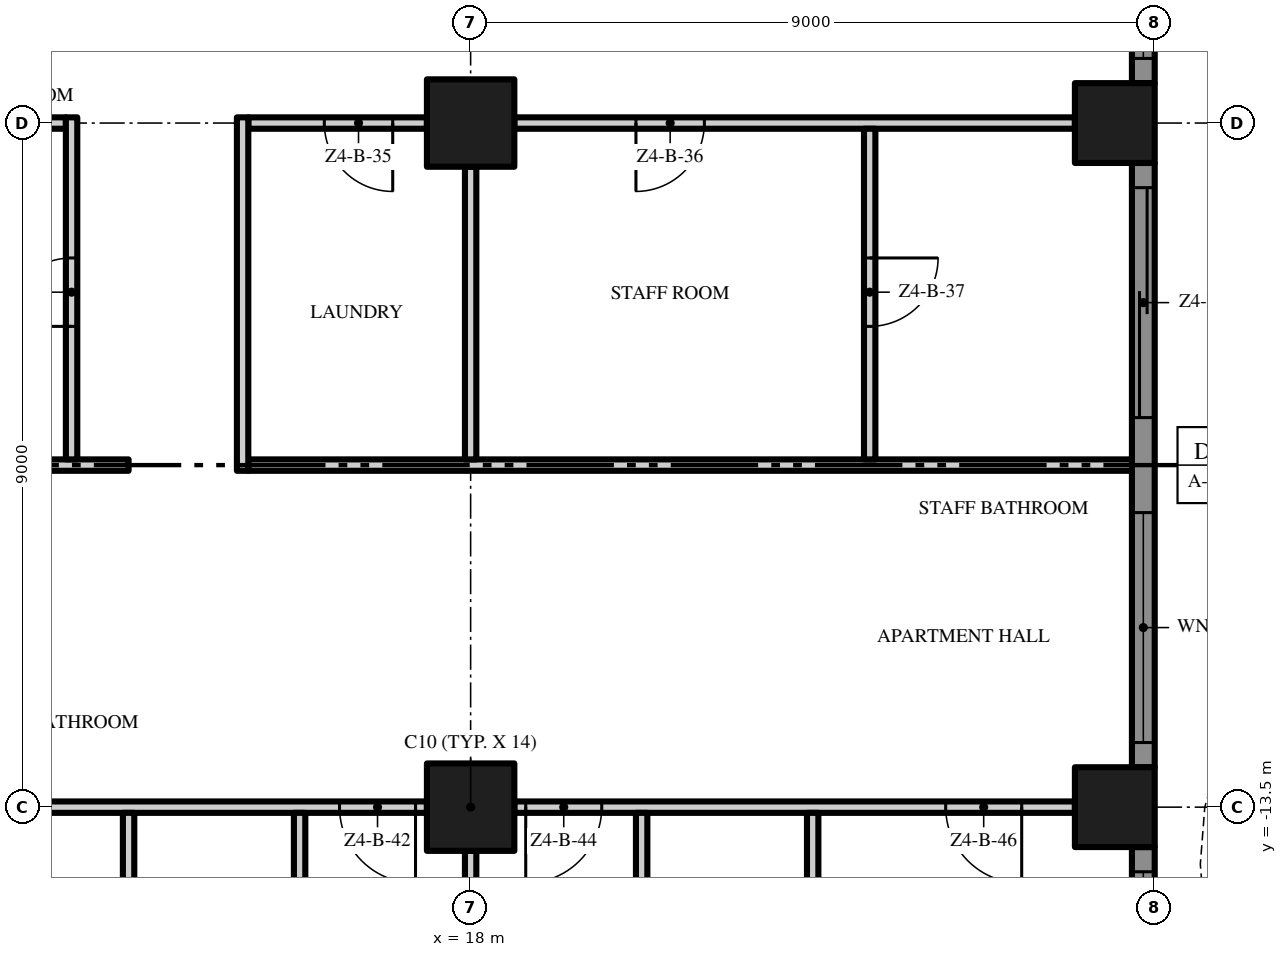
"""IFC4 building model, lengths in metres.
Left out: names, types, materials, properties, quantities, classifications, styles, units other than length and angle.
Written with IfcOpenShell. Run it as: python <this file> out.ifc"""

import sys

from ifc_helpers import new_model, si_unit, direction, frame, frame_2d, origin, origin_2d, place, context, subcontext, project, spatial, polyline, rectangle, outline, extrude, element, fill, save


model = new_model("IFC4")
c1 = context("Model", 3, precision=1e-05, world=origin(), true_north=direction((0.0, 1.0)))
c2 = subcontext(c1, "Body", "Model", "MODEL_VIEW")
j1 = project(units=[si_unit("LENGTHUNIT", "METRE"), si_unit("PLANEANGLEUNIT", "RADIAN")], contexts=[c1])
p1 = place(None, origin())
s1 = spatial("IfcSite", under=j1, at=p1, CompositionType="ELEMENT")
p2 = place(p1, origin())
s2 = spatial("IfcBuilding", under=s1, at=p2, CompositionType="ELEMENT")
p3 = place(p2, frame((0.0, 0.0, 195.8)))
s3 = spatial("IfcBuildingStorey", under=s2, at=p3, CompositionType="ELEMENT", Elevation=195.8)
for number, where, z_axis, x_axis in (
    (1, (18.0, -13.5, 0.0), (0.0, 0.0, 1.0), (1.0, 0.0, 0.0)),
    (2, (18.0, -4.5, 0.0), (0.0, 0.0, 1.0), (1.0, 0.0, 0.0)),
):
    element("IfcColumn", number, at=place(p3, frame(where, z_axis=z_axis, x_axis=x_axis)), inside=s3, PredefinedType="COLUMN", context=c2, shape_type="SweptSolid", body=[
        extrude(rectangle(XDim=1.15, YDim=1.15, at=origin_2d()), origin(), (0.0, 0.0, 1.0), 3.5),
    ])
for number, where, z_axis, x_axis in (
    (3, (26.475, -13.5, 0.0), (0.0, 0.0, 1.0), (1.0, 0.0, 0.0)),
    (4, (26.475, -4.5, 0.0), (0.0, 0.0, 1.0), (1.0, 0.0, 0.0)),
):
    element("IfcColumn", number, at=place(p3, frame(where, z_axis=z_axis, x_axis=x_axis)), inside=s3, PredefinedType="COLUMN", context=c2, shape_type="SweptSolid", body=[
        extrude(rectangle(XDim=1.05, YDim=1.05, at=origin_2d()), origin(), (0.0, 0.0, 1.0), 3.5),
    ])
p4 = place(p3, frame((26.85, -14.025, 0.0), z_axis=(0.0, 0.0, 1.0), x_axis=(0.0, -1.0, 0.0)))
e5 = element("IfcWall", 5, at=p4, inside=s3, PredefinedType="SOLIDWALL", context=c2, shape_type="SweptSolid", body=[
    extrude(rectangle(XDim=3.675, YDim=0.3, at=frame_2d((1.837, 0.0))), origin(), (0.0, 0.0, 1.0), 3.5),
])
p5 = place(p4, frame((0.325, 0.0, 0.45)))
e6 = element("IfcOpeningElement", 6, at=p5, cuts=e5, PredefinedType="OPENING", context=c2, shape_type="SweptSolid", body=[
    extrude(rectangle(XDim=3.025, YDim=2.65, at=frame_2d((1.512, 1.325))), frame((0.0, 0.16, 0.0), z_axis=(0.0, -1.0, 0.0), x_axis=(1.0, 0.0, 0.0)), (0.0, 0.0, 1.0), 0.32),
])
p6 = place(p3, frame((26.85, -5.025, 0.0), z_axis=(0.0, 0.0, 1.0), x_axis=(0.0, -1.0, 0.0)))
e7 = element("IfcWall", 7, at=p6, inside=s3, PredefinedType="SOLIDWALL", context=c2, shape_type="SweptSolid", body=[
    extrude(rectangle(XDim=7.95, YDim=0.3, at=frame_2d((3.975, 0.0))), origin(), (0.0, 0.0, 1.0), 3.5),
])
p7 = place(p6, frame((4.6, 0.0, 0.45)))
e8 = element("IfcOpeningElement", 8, at=p7, cuts=e7, PredefinedType="OPENING", context=c2, shape_type="SweptSolid", body=[
    extrude(rectangle(XDim=3.025, YDim=2.65, at=frame_2d((1.512, 1.325))), frame((0.0, 0.16, 0.0), z_axis=(0.0, -1.0, 0.0), x_axis=(1.0, 0.0, 0.0)), (0.0, 0.0, 1.0), 0.32),
])
p8 = place(p6, frame((0.325, 0.0, 0.0)))
e9 = element("IfcOpeningElement", 9, at=p8, cuts=e7, PredefinedType="OPENING", context=c2, shape_type="SweptSolid", body=[
    extrude(rectangle(XDim=3.025, YDim=2.4, at=frame_2d((1.512, 1.2))), frame((0.0, 0.16, 0.0), z_axis=(0.0, -1.0, 0.0), x_axis=(1.0, 0.0, 0.0)), (0.0, 0.0, 1.0), 0.32),
])
p9 = place(p3, frame((26.85, 3.975, 0.0), z_axis=(0.0, 0.0, 1.0), x_axis=(0.0, -1.0, 0.0)))
e10 = element("IfcWall", 10, at=p9, inside=s3, PredefinedType="SOLIDWALL", context=c2, shape_type="SweptSolid", body=[
    extrude(rectangle(XDim=7.95, YDim=0.3, at=frame_2d((3.975, 0.0))), origin(), (0.0, 0.0, 1.0), 3.5),
])
p10 = place(p9, frame((4.6, 0.0, 0.45)))
e11 = element("IfcOpeningElement", 11, at=p10, cuts=e10, PredefinedType="OPENING", context=c2, shape_type="SweptSolid", body=[
    extrude(rectangle(XDim=3.025, YDim=2.65, at=frame_2d((1.512, 1.325))), frame((0.0, 0.16, 0.0), z_axis=(0.0, -1.0, 0.0), x_axis=(1.0, 0.0, 0.0)), (0.0, 0.0, 1.0), 0.32),
])
p11 = place(p9, frame((0.325, 0.0, 0.45)))
e12 = element("IfcOpeningElement", 12, at=p11, cuts=e10, PredefinedType="OPENING", context=c2, shape_type="SweptSolid", body=[
    extrude(rectangle(XDim=3.025, YDim=2.65, at=frame_2d((1.512, 1.325))), frame((0.0, 0.16, 0.0), z_axis=(0.0, -1.0, 0.0), x_axis=(1.0, 0.0, 0.0)), (0.0, 0.0, 1.0), 0.32),
])
p12 = place(p3, origin())
e13 = element("IfcWall", 13, at=p12, inside=s3, PredefinedType="USERDEFINED", context=c2, shape_type="SweptSolid", body=[
    extrude(outline(polyline([(28.8, -18.0), (28.095, -16.5), (27.659, -15.0), (27.6, -14.25), (27.659, -13.5), (28.095, -12.0), (28.8, -10.5), (29.505, -9.0), (29.941, -7.5), (30.0, -6.75), (29.941, -6.0), (29.505, -4.5), (28.8, -3.0), (28.095, -1.5), (27.659, 0.0), (27.6, 0.75), (27.659, 1.5), (28.095, 3.0), (28.8, 4.5), (29.505, 6.0), (29.941, 7.5), (30.0, 8.25), (29.941, 9.0), (29.505, 10.5), (28.8, 12.0), (28.095, 13.5), (27.659, 15.0), (27.6, 15.75), (27.659, 16.5), (28.095, 18.0), (27.855, 18.07), (27.411, 16.545), (27.349, 15.75), (27.411, 14.955), (27.86, 13.411), (28.574, 11.894), (29.271, 10.411), (29.694, 8.955), (29.749, 8.25), (29.694, 7.545), (29.271, 6.089), (28.574, 4.606), (27.86, 3.089), (27.411, 1.545), (27.349, 0.75), (27.411, -0.045), (27.86, -1.589), (28.574, -3.106), (29.271, -4.589), (29.694, -6.045), (29.749, -6.75), (29.694, -7.455), (29.271, -8.911), (28.574, -10.394), (27.86, -11.911), (27.411, -13.455), (27.349, -14.25), (27.411, -15.045), (27.86, -16.589), (28.574, -18.106), (28.8, -18.0)])), origin(), (0.0, 0.0, 1.0), 0.9),
])
p13 = place(p3, frame((17.425, -13.5, 0.0), z_axis=(0.0, 0.0, 1.0), x_axis=(-1.0, 0.0, 0.0)))
e14 = element("IfcWall", 14, at=p13, inside=s3, PredefinedType="PARTITIONING", context=c2, shape_type="SweptSolid", body=[
    extrude(rectangle(XDim=7.85, YDim=0.15, at=frame_2d((3.925, 0.0))), origin(), (0.0, 0.0, 1.0), 3.5),
])
p14 = place(p13, frame((6.7, 0.0, 0.0)))
e15 = element("IfcOpeningElement", 15, at=p14, cuts=e14, PredefinedType="OPENING", context=c2, shape_type="SweptSolid", body=[
    extrude(rectangle(XDim=1.0, YDim=2.4, at=frame_2d((0.5, 1.2))), frame((0.0, 0.085, 0.0), z_axis=(0.0, -1.0, 0.0), x_axis=(1.0, 0.0, 0.0)), (0.0, 0.0, 1.0), 0.17),
])
p15 = place(p13, frame((0.15, 0.0, 0.0)))
e16 = element("IfcOpeningElement", 16, at=p15, cuts=e14, PredefinedType="OPENING", context=c2, shape_type="SweptSolid", body=[
    extrude(rectangle(XDim=1.0, YDim=2.4, at=frame_2d((0.5, 1.2))), frame((0.0, 0.085, 0.0), z_axis=(0.0, -1.0, 0.0), x_axis=(1.0, 0.0, 0.0)), (0.0, 0.0, 1.0), 0.17),
])
p16 = place(p3, frame((25.95, -13.5, 0.0), z_axis=(0.0, 0.0, 1.0), x_axis=(-1.0, 0.0, 0.0)))
e17 = element("IfcWall", 17, at=p16, inside=s3, PredefinedType="PARTITIONING", context=c2, shape_type="SweptSolid", body=[
    extrude(rectangle(XDim=7.375, YDim=0.15, at=frame_2d((3.688, 0.0))), origin(), (0.0, 0.0, 1.0), 3.5),
])
p17 = place(p16, frame((6.225, 0.0, 0.0)))
e18 = element("IfcOpeningElement", 18, at=p17, cuts=e17, PredefinedType="OPENING", context=c2, shape_type="SweptSolid", body=[
    extrude(rectangle(XDim=1.0, YDim=2.4, at=frame_2d((0.5, 1.2))), frame((0.0, 0.085, 0.0), z_axis=(0.0, -1.0, 0.0), x_axis=(1.0, 0.0, 0.0)), (0.0, 0.0, 1.0), 0.17),
])
p18 = place(p16, frame((0.7, 0.0, 0.0)))
e19 = element("IfcOpeningElement", 19, at=p18, cuts=e17, PredefinedType="OPENING", context=c2, shape_type="SweptSolid", body=[
    extrude(rectangle(XDim=1.0, YDim=2.4, at=frame_2d((0.5, 1.2))), frame((0.0, 0.085, 0.0), z_axis=(0.0, -1.0, 0.0), x_axis=(1.0, 0.0, 0.0)), (0.0, 0.0, 1.0), 0.17),
])
p19 = place(p3, frame((0.1, -9.0, 0.0), z_axis=(0.0, 0.0, 1.0), x_axis=(1.0, 0.0, 0.0)))
e20 = element("IfcWall", 20, at=p19, inside=s3, PredefinedType="PARTITIONING", context=c2, shape_type="SweptSolid", body=[
    extrude(rectangle(XDim=13.4, YDim=0.15, at=frame_2d((6.7, 0.0))), origin(), (0.0, 0.0, 1.0), 3.5),
])
p20 = place(p19, frame((6.9, 0.0, 0.0)))
e21 = element("IfcOpeningElement", 21, at=p20, cuts=e20, PredefinedType="OPENING", context=c2, shape_type="SweptSolid", body=[
    extrude(rectangle(XDim=1.0, YDim=2.4, at=frame_2d((0.5, 1.2))), frame((0.0, 0.085, 0.0), z_axis=(0.0, -1.0, 0.0), x_axis=(1.0, 0.0, 0.0)), (0.0, 0.0, 1.0), 0.17),
])
p21 = place(p3, frame((15.075, -9.0, 0.0), z_axis=(0.0, 0.0, 1.0), x_axis=(1.0, 0.0, 0.0)))
e22 = element("IfcWall", 22, at=p21, inside=s3, PredefinedType="PARTITIONING", context=c2, shape_type="SweptSolid", body=[
    extrude(rectangle(XDim=11.625, YDim=0.15, at=frame_2d((5.812, 0.0))), origin(), (0.0, 0.0, 1.0), 3.5),
])
p22 = place(p3, frame((9.575, -4.5, 0.0), z_axis=(0.0, 0.0, 1.0), x_axis=(1.0, 0.0, 0.0)))
e23 = element("IfcWall", 23, at=p22, inside=s3, PredefinedType="PARTITIONING", context=c2, shape_type="SweptSolid", body=[
    extrude(rectangle(XDim=3.1, YDim=0.15, at=frame_2d((1.55, 0.0))), origin(), (0.0, 0.0, 1.0), 3.5),
])
p23 = place(p3, frame((17.425, -4.5, 0.0), z_axis=(0.0, 0.0, 1.0), x_axis=(-1.0, 0.0, 0.0)))
e24 = element("IfcWall", 24, at=p23, inside=s3, PredefinedType="PARTITIONING", context=c2, shape_type="SweptSolid", body=[
    extrude(rectangle(XDim=2.35, YDim=0.15, at=frame_2d((1.175, 0.0))), origin(), (0.0, 0.0, 1.0), 3.5),
])
p24 = place(p23, frame((0.45, 0.0, 0.0)))
e25 = element("IfcOpeningElement", 25, at=p24, cuts=e24, PredefinedType="OPENING", context=c2, shape_type="SweptSolid", body=[
    extrude(rectangle(XDim=0.9, YDim=2.1, at=frame_2d((0.45, 1.05))), frame((0.0, 0.085, 0.0), z_axis=(0.0, -1.0, 0.0), x_axis=(1.0, 0.0, 0.0)), (0.0, 0.0, 1.0), 0.17),
])
p25 = place(p3, frame((25.95, -4.5, 0.0), z_axis=(0.0, 0.0, 1.0), x_axis=(-1.0, 0.0, 0.0)))
e26 = element("IfcWall", 26, at=p25, inside=s3, PredefinedType="PARTITIONING", context=c2, shape_type="SweptSolid", body=[
    extrude(rectangle(XDim=7.375, YDim=0.15, at=frame_2d((3.688, 0.0))), origin(), (0.0, 0.0, 1.0), 3.5),
])
p26 = place(p25, frame((4.875, 0.0, 0.0)))
e27 = element("IfcOpeningElement", 27, at=p26, cuts=e26, PredefinedType="OPENING", context=c2, shape_type="SweptSolid", body=[
    extrude(rectangle(XDim=0.9, YDim=2.1, at=frame_2d((0.45, 1.05))), frame((0.0, 0.085, 0.0), z_axis=(0.0, -1.0, 0.0), x_axis=(1.0, 0.0, 0.0)), (0.0, 0.0, 1.0), 0.17),
])
p27 = place(p3, frame((12.75, -8.925, 0.0), z_axis=(0.0, 0.0, 1.0), x_axis=(0.0, 1.0, 0.0)))
e28 = element("IfcWall", 28, at=p27, inside=s3, PredefinedType="PARTITIONING", context=c2, shape_type="SweptSolid", body=[
    extrude(rectangle(XDim=4.5, YDim=0.15, at=frame_2d((2.25, 0.0))), origin(), (0.0, 0.0, 1.0), 3.5),
])
p28 = place(p27, frame((1.75, 0.0, 0.0)))
e29 = element("IfcOpeningElement", 29, at=p28, cuts=e28, PredefinedType="OPENING", context=c2, shape_type="SweptSolid", body=[
    extrude(rectangle(XDim=0.9, YDim=2.1, at=frame_2d((0.45, 1.05))), frame((0.0, 0.085, 0.0), z_axis=(0.0, -1.0, 0.0), x_axis=(1.0, 0.0, 0.0)), (0.0, 0.0, 1.0), 0.17),
])
p29 = place(p3, frame((13.5, -22.2, 0.0), z_axis=(0.0, 0.0, 1.0), x_axis=(0.0, 1.0, 0.0)))
e30 = element("IfcWall", 30, at=p29, inside=s3, PredefinedType="PARTITIONING", context=c2, shape_type="SweptSolid", body=[
    extrude(rectangle(XDim=8.625, YDim=0.15, at=frame_2d((4.312, 0.0))), origin(), (0.0, 0.0, 1.0), 3.5),
])
p30 = place(p3, frame((15.0, -9.075, 0.0), z_axis=(0.0, 0.0, 1.0), x_axis=(0.0, 1.0, 0.0)))
e31 = element("IfcWall", 31, at=p30, inside=s3, PredefinedType="PARTITIONING", context=c2, shape_type="SweptSolid", body=[
    extrude(rectangle(XDim=4.65, YDim=0.15, at=frame_2d((2.325, 0.0))), origin(), (0.0, 0.0, 1.0), 3.5),
])
p31 = place(p3, frame((15.75, -16.575, 0.0), z_axis=(0.0, 0.0, 1.0), x_axis=(0.0, 1.0, 0.0)))
e32 = element("IfcWall", 32, at=p31, inside=s3, PredefinedType="PARTITIONING", context=c2, shape_type="SweptSolid", body=[
    extrude(rectangle(XDim=3.0, YDim=0.15, at=frame_2d((1.5, 0.0))), origin(), (0.0, 0.0, 1.0), 3.5),
])
p32 = place(p3, frame((18.0, -21.45, 0.0), z_axis=(0.0, 0.0, 1.0), x_axis=(0.0, 1.0, 0.0)))
e33 = element("IfcWall", 33, at=p32, inside=s3, PredefinedType="PARTITIONING", context=c2, shape_type="SweptSolid", body=[
    extrude(rectangle(XDim=7.375, YDim=0.15, at=frame_2d((3.688, 0.0))), origin(), (0.0, 0.0, 1.0), 3.5),
])
p33 = place(p3, frame((18.0, -8.925, 0.0), z_axis=(0.0, 0.0, 1.0), x_axis=(0.0, 1.0, 0.0)))
e34 = element("IfcWall", 34, at=p33, inside=s3, PredefinedType="PARTITIONING", context=c2, shape_type="SweptSolid", body=[
    extrude(rectangle(XDim=3.85, YDim=0.15, at=frame_2d((1.925, 0.0))), origin(), (0.0, 0.0, 1.0), 3.5),
])
p34 = place(p3, frame((20.25, -16.575, 0.0), z_axis=(0.0, 0.0, 1.0), x_axis=(0.0, 1.0, 0.0)))
e35 = element("IfcWall", 35, at=p34, inside=s3, PredefinedType="PARTITIONING", context=c2, shape_type="SweptSolid", body=[
    extrude(rectangle(XDim=3.0, YDim=0.15, at=frame_2d((1.5, 0.0))), origin(), (0.0, 0.0, 1.0), 3.5),
])
p35 = place(p3, frame((22.5, -17.475, 0.0), z_axis=(0.0, 0.0, 1.0), x_axis=(0.0, 1.0, 0.0)))
e36 = element("IfcWall", 36, at=p35, inside=s3, PredefinedType="PARTITIONING", context=c2, shape_type="SweptSolid", body=[
    extrude(rectangle(XDim=3.9, YDim=0.15, at=frame_2d((1.95, 0.0))), origin(), (0.0, 0.0, 1.0), 3.5),
])
p36 = place(p3, frame((23.25, -4.575, 0.0), z_axis=(0.0, 0.0, 1.0), x_axis=(0.0, -1.0, 0.0)))
e37 = element("IfcWall", 37, at=p36, inside=s3, PredefinedType="PARTITIONING", context=c2, shape_type="SweptSolid", body=[
    extrude(rectangle(XDim=4.35, YDim=0.15, at=frame_2d((2.175, 0.0))), origin(), (0.0, 0.0, 1.0), 3.5),
])
p37 = place(p36, frame((1.7, 0.0, 0.0)))
e38 = element("IfcOpeningElement", 38, at=p37, cuts=e37, PredefinedType="OPENING", context=c2, shape_type="SweptSolid", body=[
    extrude(rectangle(XDim=0.9, YDim=2.1, at=frame_2d((0.45, 1.05))), frame((0.0, 0.085, 0.0), z_axis=(0.0, -1.0, 0.0), x_axis=(1.0, 0.0, 0.0)), (0.0, 0.0, 1.0), 0.17),
])
p38 = place(p5, origin())
e39 = element("IfcWindow", 39, at=p38, inside=s3, PartitioningType="SINGLE_PANEL", PredefinedType="WINDOW", context=c2, shape_type="SweptSolid", body=[
    extrude(rectangle(XDim=3.025, YDim=2.65, at=frame_2d((1.512, 1.325))), frame((0.0, 0.03, 0.0), z_axis=(0.0, -1.0, 0.0), x_axis=(1.0, 0.0, 0.0)), (0.0, 0.0, 1.0), 0.06),
])
fill(e6, e39)
p39 = place(p7, origin())
e40 = element("IfcWindow", 40, at=p39, inside=s3, PartitioningType="SINGLE_PANEL", PredefinedType="WINDOW", context=c2, shape_type="SweptSolid", body=[
    extrude(rectangle(XDim=3.025, YDim=2.65, at=frame_2d((1.512, 1.325))), frame((0.0, 0.03, 0.0), z_axis=(0.0, -1.0, 0.0), x_axis=(1.0, 0.0, 0.0)), (0.0, 0.0, 1.0), 0.06),
])
fill(e8, e40)
p40 = place(p8, origin())
e41 = element("IfcDoor", 41, at=p40, inside=s3, OperationType="SINGLE_SWING_LEFT", PredefinedType="DOOR", context=c2, shape_type="SweptSolid", body=[
    extrude(rectangle(XDim=3.025, YDim=2.4, at=frame_2d((1.512, 1.2))), frame((0.0, 0.025, 0.0), z_axis=(0.0, -1.0, 0.0), x_axis=(1.0, 0.0, 0.0)), (0.0, 0.0, 1.0), 0.05),
])
fill(e9, e41)
p41 = place(p10, origin())
e42 = element("IfcWindow", 42, at=p41, inside=s3, PartitioningType="SINGLE_PANEL", PredefinedType="WINDOW", context=c2, shape_type="SweptSolid", body=[
    extrude(rectangle(XDim=3.025, YDim=2.65, at=frame_2d((1.512, 1.325))), frame((0.0, 0.03, 0.0), z_axis=(0.0, -1.0, 0.0), x_axis=(1.0, 0.0, 0.0)), (0.0, 0.0, 1.0), 0.06),
])
fill(e11, e42)
p42 = place(p28, origin())
e43 = element("IfcDoor", 43, at=p42, inside=s3, OperationType="SINGLE_SWING_LEFT", PredefinedType="DOOR", context=c2, shape_type="SweptSolid", body=[
    extrude(rectangle(XDim=0.9, YDim=2.1, at=frame_2d((0.45, 1.05))), frame((0.0, 0.025, 0.0), z_axis=(0.0, -1.0, 0.0), x_axis=(1.0, 0.0, 0.0)), (0.0, 0.0, 1.0), 0.05),
])
fill(e29, e43)
p43 = place(p24, origin())
e44 = element("IfcDoor", 44, at=p43, inside=s3, OperationType="SINGLE_SWING_LEFT", PredefinedType="DOOR", context=c2, shape_type="SweptSolid", body=[
    extrude(rectangle(XDim=0.9, YDim=2.1, at=frame_2d((0.45, 1.05))), frame((0.0, 0.025, 0.0), z_axis=(0.0, -1.0, 0.0), x_axis=(1.0, 0.0, 0.0)), (0.0, 0.0, 1.0), 0.05),
])
fill(e25, e44)
p44 = place(p26, origin())
e45 = element("IfcDoor", 45, at=p44, inside=s3, OperationType="SINGLE_SWING_RIGHT", PredefinedType="DOOR", context=c2, shape_type="SweptSolid", body=[
    extrude(rectangle(XDim=0.9, YDim=2.1, at=frame_2d((0.45, 1.05))), frame((0.0, 0.025, 0.0), z_axis=(0.0, -1.0, 0.0), x_axis=(1.0, 0.0, 0.0)), (0.0, 0.0, 1.0), 0.05),
])
fill(e27, e45)
p45 = place(p37, origin())
e46 = element("IfcDoor", 46, at=p45, inside=s3, OperationType="SINGLE_SWING_LEFT", PredefinedType="DOOR", context=c2, shape_type="SweptSolid", body=[
    extrude(rectangle(XDim=0.9, YDim=2.1, at=frame_2d((0.45, 1.05))), frame((0.0, 0.025, 0.0), z_axis=(0.0, -1.0, 0.0), x_axis=(1.0, 0.0, 0.0)), (0.0, 0.0, 1.0), 0.05),
])
fill(e38, e46)
p46 = place(p15, origin())
e47 = element("IfcDoor", 47, at=p46, inside=s3, OperationType="SINGLE_SWING_LEFT", PredefinedType="DOOR", context=c2, shape_type="SweptSolid", body=[
    extrude(rectangle(XDim=1.0, YDim=2.4, at=frame_2d((0.5, 1.2))), frame((0.0, 0.025, 0.0), z_axis=(0.0, -1.0, 0.0), x_axis=(1.0, 0.0, 0.0)), (0.0, 0.0, 1.0), 0.05),
])
fill(e16, e47)
p47 = place(p17, origin())
e48 = element("IfcDoor", 48, at=p47, inside=s3, OperationType="SINGLE_SWING_RIGHT", PredefinedType="DOOR", context=c2, shape_type="SweptSolid", body=[
    extrude(rectangle(XDim=1.0, YDim=2.4, at=frame_2d((0.5, 1.2))), frame((0.0, 0.025, 0.0), z_axis=(0.0, -1.0, 0.0), x_axis=(1.0, 0.0, 0.0)), (0.0, 0.0, 1.0), 0.05),
])
fill(e18, e48)
p48 = place(p18, origin())
e49 = element("IfcDoor", 49, at=p48, inside=s3, OperationType="SINGLE_SWING_LEFT", PredefinedType="DOOR", context=c2, shape_type="SweptSolid", body=[
    extrude(rectangle(XDim=1.0, YDim=2.4, at=frame_2d((0.5, 1.2))), frame((0.0, 0.025, 0.0), z_axis=(0.0, -1.0, 0.0), x_axis=(1.0, 0.0, 0.0)), (0.0, 0.0, 1.0), 0.05),
])
fill(e19, e49)
save(model, sys.argv[1])
